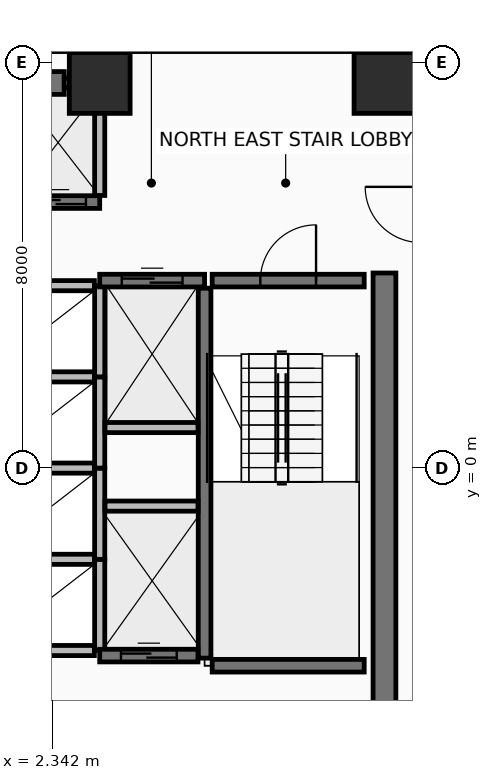
"""IFC4 building model, lengths in metres.
Left out: names, types, materials, properties, quantities, classifications, styles, units other than length and angle.
Written with IfcOpenShell. Run it as: python <this file> out.ifc"""

import sys

from ifc_helpers import new_model, si_unit, direction, frame, frame_2d, origin, origin_2d, place, context, subcontext, project, spatial, rectangle, extrude, element, fill, save


model = new_model("IFC4")
c1 = context("Model", 3, precision=1e-05, world=origin(), true_north=direction((0.0, 1.0)))
c2 = subcontext(c1, "Body", "Model", "MODEL_VIEW")
j1 = project(units=[si_unit("LENGTHUNIT", "METRE"), si_unit("PLANEANGLEUNIT", "RADIAN")], contexts=[c1])
p1 = place(None, origin())
s1 = spatial("IfcSite", under=j1, at=p1, CompositionType="ELEMENT")
p2 = place(p1, origin())
s2 = spatial("IfcBuilding", under=s1, at=p2, CompositionType="ELEMENT")
p3 = place(p2, frame((0.0, 0.0, 104.1)))
s3 = spatial("IfcBuildingStorey", under=s2, at=p3, CompositionType="ELEMENT", Elevation=104.1)
for number, where, z_axis, x_axis in (
    (1, (8.9, 7.6, 0.0), (0.0, 0.0, 1.0), (1.0, 0.0, 0.0)),
    (2, (3.28, 7.6, 0.0), (0.0, 0.0, 1.0), (1.0, 0.0, 0.0)),
):
    element("IfcColumn", number, at=place(p3, frame(where, z_axis=z_axis, x_axis=x_axis)), inside=s3, PredefinedType="COLUMN", context=c2, shape_type="SweptSolid", body=[
        extrude(rectangle(XDim=1.2, YDim=1.2, at=origin_2d()), origin(), (0.0, 0.0, 1.0), 3.6),
    ])
p4 = place(p3, frame((-2.8, 7.6, 0.0), z_axis=(0.0, 0.0, 1.0), x_axis=(1.0, 0.0, 0.0)))
e3 = element("IfcWall", 3, at=p4, inside=s3, PredefinedType="SHEAR", context=c2, shape_type="SweptSolid", body=[
    extrude(rectangle(XDim=5.38, YDim=0.45, at=frame_2d((2.69, 0.0))), origin(), (0.0, 0.0, 1.0), 3.41),
])
p5 = place(p3, frame((8.9, -6.85, 0.0), z_axis=(0.0, 0.0, 1.0), x_axis=(0.0, 1.0, 0.0)))
e4 = element("IfcWall", 4, at=p5, inside=s3, PredefinedType="SHEAR", context=c2, shape_type="SweptSolid", body=[
    extrude(rectangle(XDim=10.7, YDim=0.45, at=frame_2d((5.35, 0.0))), origin(), (0.0, 0.0, 1.0), 3.41),
])
p6 = place(p3, frame((5.35, -3.75, 0.0), z_axis=(0.0, 0.0, 1.0), x_axis=(0.0, 1.0, 0.0)))
e5 = element("IfcWall", 5, at=p6, inside=s3, PredefinedType="SHEAR", context=c2, shape_type="SweptSolid", body=[
    extrude(rectangle(XDim=7.3, YDim=0.25, at=frame_2d((3.65, 0.0))), origin(), (0.0, 0.0, 1.0), 3.41),
])
p7 = place(p3, frame((5.5, 3.7, 0.0), z_axis=(0.0, 0.0, 1.0), x_axis=(1.0, 0.0, 0.0)))
e6 = element("IfcWall", 6, at=p7, inside=s3, PredefinedType="SHEAR", context=c2, shape_type="SweptSolid", body=[
    extrude(rectangle(XDim=3.0, YDim=0.25, at=frame_2d((1.5, 0.0))), origin(), (0.0, 0.0, 1.0), 3.41),
])
p8 = place(p7, frame((0.95, 0.0, 0.0)))
e7 = element("IfcOpeningElement", 7, at=p8, cuts=e6, PredefinedType="OPENING", context=c2, shape_type="SweptSolid", body=[
    extrude(rectangle(XDim=1.1, YDim=2.15, at=frame_2d((0.55, 1.075))), frame((0.0, 0.135, 0.0), z_axis=(0.0, -1.0, 0.0), x_axis=(1.0, 0.0, 0.0)), (0.0, 0.0, 1.0), 0.27),
])
p9 = place(p3, frame((5.5, -3.9, 0.0), z_axis=(0.0, 0.0, 1.0), x_axis=(1.0, 0.0, 0.0)))
e8 = element("IfcWall", 8, at=p9, inside=s3, PredefinedType="SHEAR", context=c2, shape_type="SweptSolid", body=[
    extrude(rectangle(XDim=3.0, YDim=0.25, at=frame_2d((1.5, 0.0))), origin(), (0.0, 0.0, 1.0), 3.41),
])
p10 = place(p3, frame((1.637, 5.25, 0.0), z_axis=(0.0, 0.0, 1.0), x_axis=(1.0, 0.0, 0.0)))
e9 = element("IfcWall", 9, at=p10, inside=s3, PredefinedType="SHEAR", context=c2, shape_type="SweptSolid", body=[
    extrude(rectangle(XDim=1.643, YDim=0.25, at=frame_2d((0.821, 0.0))), origin(), (0.0, 0.0, 1.0), 3.41),
])
p11 = place(p10, frame((0.271, 0.0, 0.0)))
e10 = element("IfcOpeningElement", 10, at=p11, cuts=e9, PredefinedType="OPENING", context=c2, shape_type="SweptSolid", body=[
    extrude(rectangle(XDim=1.1, YDim=2.2, at=frame_2d((0.55, 1.1))), frame((0.0, 0.135, 0.0), z_axis=(0.0, -1.0, 0.0), x_axis=(1.0, 0.0, 0.0)), (0.0, 0.0, 1.0), 0.27),
])
p12 = place(p3, frame((2.58, 7.6, 0.0), z_axis=(0.0, 0.0, 1.0), x_axis=(1.0, 0.0, 0.0)))
e11 = element("IfcWall", 11, at=p12, inside=s3, PredefinedType="PARTITIONING", context=c2, shape_type="SweptSolid", body=[
    extrude(rectangle(XDim=0.7, YDim=0.2, at=frame_2d((0.35, 0.0))), origin(), (0.0, 0.0, 1.0), 2.605),
])
p13 = place(p3, frame((3.28, 5.38, 0.0), z_axis=(0.0, 0.0, 1.0), x_axis=(0.0, 1.0, 0.0)))
e12 = element("IfcWall", 12, at=p13, inside=s3, PredefinedType="PARTITIONING", context=c2, shape_type="SweptSolid", body=[
    extrude(rectangle(XDim=2.115, YDim=0.2, at=frame_2d((1.058, 0.0))), origin(), (0.0, 0.0, 1.0), 2.605),
])
p14 = place(p3, frame((3.28, -3.6, 0.0), z_axis=(0.0, 0.0, 1.0), x_axis=(0.0, 1.0, 0.0)))
e13 = element("IfcWall", 13, at=p14, inside=s3, PredefinedType="PARTITIONING", context=c2, shape_type="SweptSolid", body=[
    extrude(rectangle(XDim=1.8, YDim=0.2, at=frame_2d((0.9, 0.0))), origin(), (0.0, 0.0, 1.0), 3.41),
])
for number, where, z_axis, x_axis in (
    (14, (1.13, -3.6, 0.0), (0.0, 0.0, 1.0), (1.0, 0.0, 0.0)),
    (15, (1.13, -1.8, 0.0), (0.0, 0.0, 1.0), (1.0, 0.0, 0.0)),
):
    element("IfcWall", number, at=place(p3, frame(where, z_axis=z_axis, x_axis=x_axis)), inside=s3, PredefinedType="PARTITIONING", context=c2, shape_type="SweptSolid", body=[
        extrude(rectangle(XDim=2.045, YDim=0.2, at=frame_2d((1.022, 0.0))), origin(), (0.0, 0.0, 1.0), 3.41),
    ])
p15 = place(p3, frame((3.28, -1.8, 0.0), z_axis=(0.0, 0.0, 1.0), x_axis=(0.0, 1.0, 0.0)))
e16 = element("IfcWall", 16, at=p15, inside=s3, PredefinedType="PARTITIONING", context=c2, shape_type="SweptSolid", body=[
    extrude(rectangle(XDim=1.8, YDim=0.2, at=frame_2d((0.9, 0.0))), origin(), (0.0, 0.0, 1.0), 3.41),
])
p16 = place(p3, frame((1.13, 0.0, 0.0), z_axis=(0.0, 0.0, 1.0), x_axis=(1.0, 0.0, 0.0)))
e17 = element("IfcWall", 17, at=p16, inside=s3, PredefinedType="PARTITIONING", context=c2, shape_type="SweptSolid", body=[
    extrude(rectangle(XDim=2.045, YDim=0.2, at=frame_2d((1.022, 0.0))), origin(), (0.0, 0.0, 1.0), 3.41),
])
p17 = place(p3, frame((3.28, 0.0, 0.0), z_axis=(0.0, 0.0, 1.0), x_axis=(0.0, 1.0, 0.0)))
e18 = element("IfcWall", 18, at=p17, inside=s3, PredefinedType="PARTITIONING", context=c2, shape_type="SweptSolid", body=[
    extrude(rectangle(XDim=1.8, YDim=0.2, at=frame_2d((0.9, 0.0))), origin(), (0.0, 0.0, 1.0), 3.41),
])
p18 = place(p3, frame((1.13, 1.8, 0.0), z_axis=(0.0, 0.0, 1.0), x_axis=(1.0, 0.0, 0.0)))
e19 = element("IfcWall", 19, at=p18, inside=s3, PredefinedType="PARTITIONING", context=c2, shape_type="SweptSolid", body=[
    extrude(rectangle(XDim=2.045, YDim=0.2, at=frame_2d((1.022, 0.0))), origin(), (0.0, 0.0, 1.0), 3.41),
])
p19 = place(p3, frame((3.28, 1.8, 0.0), z_axis=(0.0, 0.0, 1.0), x_axis=(0.0, 1.0, 0.0)))
e20 = element("IfcWall", 20, at=p19, inside=s3, PredefinedType="PARTITIONING", context=c2, shape_type="SweptSolid", body=[
    extrude(rectangle(XDim=1.8, YDim=0.2, at=frame_2d((0.9, 0.0))), origin(), (0.0, 0.0, 1.0), 3.41),
])
p20 = place(p3, frame((1.13, 3.6, 0.0), z_axis=(0.0, 0.0, 1.0), x_axis=(1.0, 0.0, 0.0)))
e21 = element("IfcWall", 21, at=p20, inside=s3, PredefinedType="PARTITIONING", context=c2, shape_type="SweptSolid", body=[
    extrude(rectangle(XDim=2.045, YDim=0.2, at=frame_2d((1.022, 0.0))), origin(), (0.0, 0.0, 1.0), 2.605),
])
p21 = place(p3, frame((3.28, 3.7, 0.0), z_axis=(0.0, 0.0, 1.0), x_axis=(1.0, 0.0, 0.0)))
e22 = element("IfcWall", 22, at=p21, inside=s3, PredefinedType="SHEAR", context=c2, shape_type="SweptSolid", body=[
    extrude(rectangle(XDim=2.07, YDim=0.25, at=frame_2d((1.035, 0.0))), origin(), (0.0, 0.0, 1.0), 3.41),
])
p22 = place(p21, frame((0.435, 0.0, 0.0)))
e23 = element("IfcOpeningElement", 23, at=p22, cuts=e22, PredefinedType="OPENING", context=c2, shape_type="SweptSolid", body=[
    extrude(rectangle(XDim=1.2, YDim=2.2, at=frame_2d((0.6, 1.1))), frame((0.0, 0.135, 0.0), z_axis=(0.0, -1.0, 0.0), x_axis=(1.0, 0.0, 0.0)), (0.0, 0.0, 1.0), 0.27),
])
p23 = place(p3, frame((3.385, 0.8, 0.0), z_axis=(0.0, 0.0, 1.0), x_axis=(1.0, 0.0, 0.0)))
e24 = element("IfcWall", 24, at=p23, inside=s3, PredefinedType="PARTITIONING", context=c2, shape_type="SweptSolid", body=[
    extrude(rectangle(XDim=1.835, YDim=0.2, at=frame_2d((0.917, 0.0))), origin(), (0.0, 0.0, 1.0), 3.41),
])
p24 = place(p3, frame((3.28, -3.7, 0.0), z_axis=(0.0, 0.0, 1.0), x_axis=(1.0, 0.0, 0.0)))
e25 = element("IfcWall", 25, at=p24, inside=s3, PredefinedType="SHEAR", context=c2, shape_type="SweptSolid", body=[
    extrude(rectangle(XDim=1.94, YDim=0.25, at=frame_2d((0.97, 0.0))), origin(), (0.0, 0.0, 1.0), 3.41),
])
p25 = place(p24, frame((0.42, 0.0, 0.0)))
e26 = element("IfcOpeningElement", 26, at=p25, cuts=e25, PredefinedType="OPENING", context=c2, shape_type="SweptSolid", body=[
    extrude(rectangle(XDim=1.1, YDim=2.2, at=frame_2d((0.55, 1.1))), frame((0.0, 0.135, 0.0), z_axis=(0.0, -1.0, 0.0), x_axis=(1.0, 0.0, 0.0)), (0.0, 0.0, 1.0), 0.27),
])
p26 = place(p3, frame((3.385, -0.75, 0.0), z_axis=(0.0, 0.0, 1.0), x_axis=(1.0, 0.0, 0.0)))
e27 = element("IfcWall", 27, at=p26, inside=s3, PredefinedType="PARTITIONING", context=c2, shape_type="SweptSolid", body=[
    extrude(rectangle(XDim=1.835, YDim=0.2, at=frame_2d((0.917, 0.0))), origin(), (0.0, 0.0, 1.0), 3.41),
])
p27 = place(p8, frame((1.1, 0.0, 0.0), z_axis=(0.0, 0.0, 1.0), x_axis=(-1.0, 0.0, 0.0)))
e28 = element("IfcDoor", 28, at=p27, inside=s3, OperationType="SINGLE_SWING_LEFT", PredefinedType="DOOR", context=c2, shape_type="SweptSolid", body=[
    extrude(rectangle(XDim=1.1, YDim=2.15, at=frame_2d((0.55, 1.075))), frame((0.0, 0.025, 0.0), z_axis=(0.0, -1.0, 0.0), x_axis=(1.0, 0.0, 0.0)), (0.0, 0.0, 1.0), 0.05),
])
fill(e7, e28)
p28 = place(p11, origin())
e29 = element("IfcDoor", 29, at=p28, inside=s3, OperationType="SLIDING_TO_LEFT", PredefinedType="DOOR", context=c2, shape_type="SweptSolid", body=[
    extrude(rectangle(XDim=1.1, YDim=2.2, at=frame_2d((0.55, 1.1))), frame((0.0, 0.025, 0.0), z_axis=(0.0, -1.0, 0.0), x_axis=(1.0, 0.0, 0.0)), (0.0, 0.0, 1.0), 0.05),
])
fill(e10, e29)
p29 = place(p22, origin())
e30 = element("IfcDoor", 30, at=p29, inside=s3, OperationType="SLIDING_TO_RIGHT", PredefinedType="DOOR", context=c2, shape_type="SweptSolid", body=[
    extrude(rectangle(XDim=1.2, YDim=2.2, at=frame_2d((0.6, 1.1))), frame((0.0, 0.025, 0.0), z_axis=(0.0, -1.0, 0.0), x_axis=(1.0, 0.0, 0.0)), (0.0, 0.0, 1.0), 0.05),
])
fill(e23, e30)
p30 = place(p25, origin())
e31 = element("IfcDoor", 31, at=p30, inside=s3, OperationType="SLIDING_TO_LEFT", PredefinedType="DOOR", context=c2, shape_type="SweptSolid", body=[
    extrude(rectangle(XDim=1.1, YDim=2.2, at=frame_2d((0.55, 1.1))), frame((0.0, 0.025, 0.0), z_axis=(0.0, -1.0, 0.0), x_axis=(1.0, 0.0, 0.0)), (0.0, 0.0, 1.0), 0.05),
])
fill(e26, e31)
save(model, sys.argv[1])
